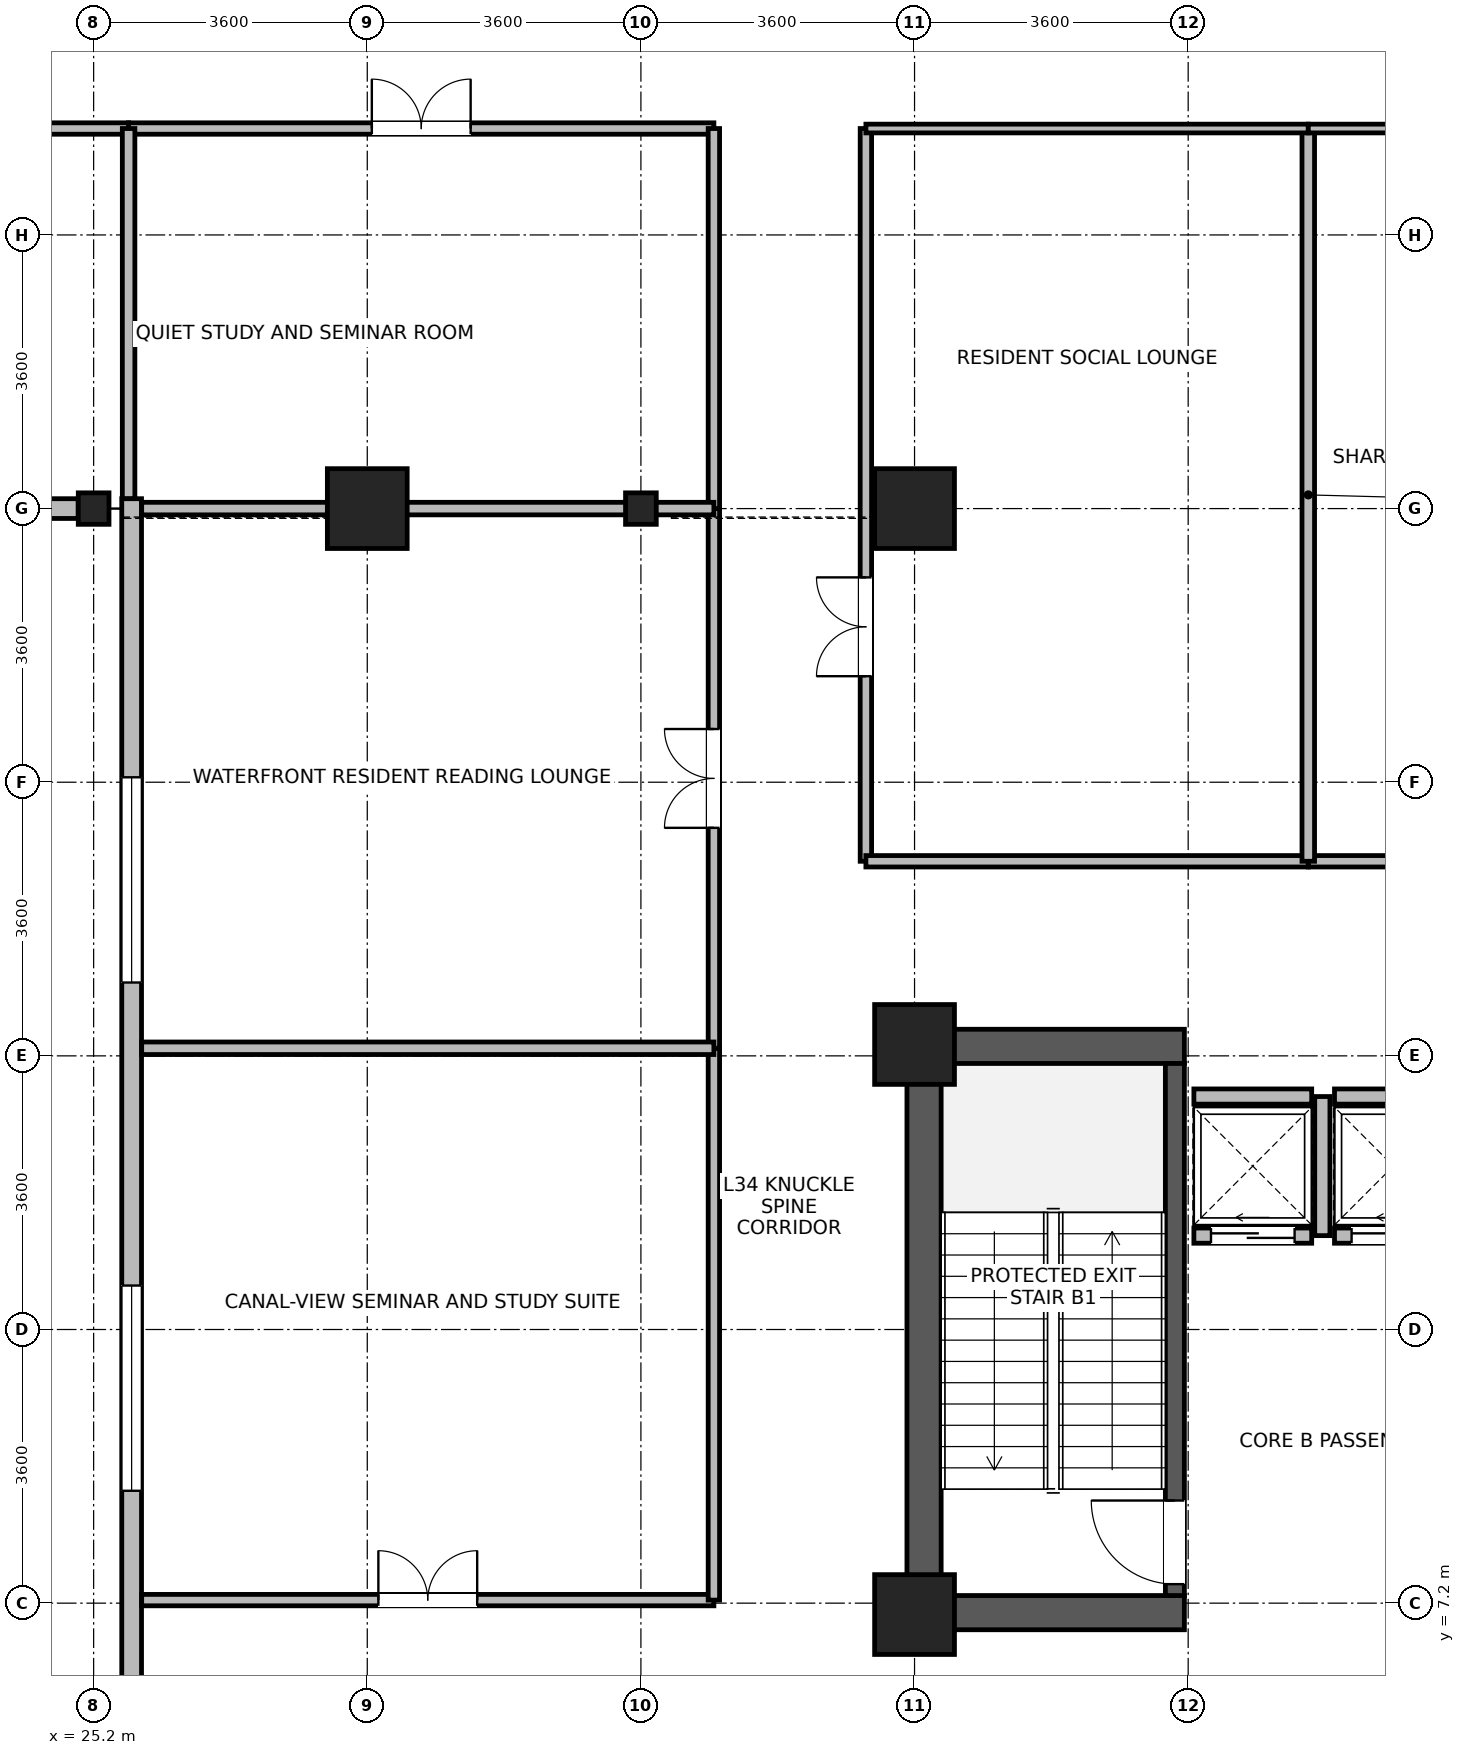
"""IFC4 building model, lengths in metres.
Left out: names, types, materials, properties, quantities, classifications, styles, units other than length and angle.
Written with IfcOpenShell. Run it as: python <this file> out.ifc"""

import sys

from ifc_helpers import new_model, si_unit, direction, frame, frame_2d, origin, origin_2d, place, context, subcontext, project, spatial, rectangle, i_section, extrude, source, transform, mapped, element, fill, save


model = new_model("IFC4")
c1 = context("Model", 3, precision=1e-05, world=origin(), true_north=direction((0.0, 1.0)))
c2 = subcontext(c1, "Body", "Model", "MODEL_VIEW")
j1 = project(units=[si_unit("LENGTHUNIT", "METRE"), si_unit("PLANEANGLEUNIT", "RADIAN")], contexts=[c1])
p1 = place(None, origin())
s1 = spatial("IfcSite", under=j1, at=p1, CompositionType="ELEMENT")
p2 = place(p1, origin())
s2 = spatial("IfcBuilding", under=s1, at=p2, CompositionType="ELEMENT")
p3 = place(p2, frame((0.0, 0.0, 135.6)))
s3 = spatial("IfcBuildingStorey", under=s2, at=p3, CompositionType="ELEMENT", Elevation=135.6)
p4 = place(p3, frame((36.125, 6.85, 0.0), z_axis=(0.0, 0.0, 1.0), x_axis=(0.0, 1.0, 0.0)))
e1 = element("IfcWall", 1, at=p4, inside=s3, PredefinedType="SHEAR", context=c2, shape_type="SweptSolid", body=[
    extrude(rectangle(XDim=7.9, YDim=0.45, at=frame_2d((3.95, 0.0))), origin(), (0.0, 0.0, 1.0), 4.36),
])
for number, where, z_axis, x_axis in (
    (2, (36.35, 7.075, 0.0), (0.0, 0.0, 1.0), (1.0, 0.0, 0.0)),
    (3, (36.35, 14.525, 0.0), (0.0, 0.0, 1.0), (1.0, 0.0, 0.0)),
):
    element("IfcWall", number, at=place(p3, frame(where, z_axis=z_axis, x_axis=x_axis)), inside=s3, PredefinedType="SHEAR", context=c2, shape_type="SweptSolid", body=[
        extrude(rectangle(XDim=3.2, YDim=0.45, at=frame_2d((1.6, 0.0))), origin(), (0.0, 0.0, 1.0), 4.36),
    ])
p5 = place(p3, frame((39.425, 7.3, 0.0), z_axis=(0.0, 0.0, 1.0), x_axis=(0.0, 1.0, 0.0)))
e4 = element("IfcWall", 4, at=p5, inside=s3, PredefinedType="SHEAR", context=c2, shape_type="SweptSolid", body=[
    extrude(rectangle(XDim=7.0, YDim=0.25, at=frame_2d((3.5, 0.0))), origin(), (0.0, 0.0, 1.0), 4.36),
])
p6 = place(p5, frame((0.15, 0.0, 0.0)))
e5 = element("IfcOpeningElement", 5, at=p6, cuts=e4, PredefinedType="OPENING", context=c2, shape_type="SweptSolid", body=[
    extrude(rectangle(XDim=1.1, YDim=2.08, at=frame_2d((0.55, 1.04))), frame((0.0, 0.135, 0.0), z_axis=(0.0, -1.0, 0.0), x_axis=(1.0, 0.0, 0.0)), (0.0, 0.0, 1.0), 0.27),
])
m1 = source(origin(), c2, "Body", "SweptSolid", [
    extrude(rectangle(XDim=1.05, YDim=1.05, at=origin_2d()), origin(), (0.0, 0.0, 1.0), 4.6),
])
for number, where, z_axis, x_axis in (
    (6, (28.8, 21.6, 0.0), (0.0, 0.0, 1.0), (1.0, 0.0, 0.0)),
    (7, (36.0, 21.6, 0.0), (0.0, 0.0, 1.0), (1.0, 0.0, 0.0)),
    (8, (36.0, 7.05, 0.0), (0.0, 0.0, 1.0), (1.0, 0.0, 0.0)),
    (9, (36.0, 14.55, 0.0), (0.0, 0.0, 1.0), (1.0, 0.0, 0.0)),
):
    element("IfcColumn", number, at=place(p3, frame(where, z_axis=z_axis, x_axis=x_axis)), inside=s3, PredefinedType="COLUMN", context=c2, shape_type="MappedRepresentation", body=[
        mapped(m1, transform((0.0, 0.0, 0.0), x_axis=(1.0, 0.0, 0.0), y_axis=(0.0, 1.0, 0.0), z_axis=(0.0, 0.0, 1.0), scale=1.0)),
    ])
m2 = source(origin(), c2, "Body", "SweptSolid", [
    extrude(i_section(OverallWidth=0.404, OverallDepth=0.414, WebThickness=0.021, FlangeThickness=0.028, FilletRadius=0.015, at=origin_2d()), origin(), (0.0, 0.0, 1.0), 4.6),
])
for number, where, z_axis, x_axis in (
    (10, (25.2, 21.6, 0.0), (0.0, 0.0, 1.0), (1.0, 0.0, 0.0)),
    (11, (32.4, 21.6, 0.0), (0.0, 0.0, 1.0), (1.0, 0.0, 0.0)),
):
    element("IfcColumn", number, at=place(p3, frame(where, z_axis=z_axis, x_axis=x_axis)), inside=s3, PredefinedType="COLUMN", context=c2, shape_type="MappedRepresentation", body=[
        mapped(m2, transform((0.0, 0.0, 0.0), x_axis=(1.0, 0.0, 0.0), y_axis=(0.0, 1.0, 0.0), z_axis=(0.0, 0.0, 1.0), scale=1.0)),
    ])
p7 = place(p3, frame((24.997, 21.6, 0.0), z_axis=(0.0, 0.0, 1.0), x_axis=(-1.0, 0.0, 0.0)))
e12 = element("IfcWall", 12, at=p7, inside=s3, PredefinedType="STANDARD", context=c2, shape_type="SweptSolid", body=[
    extrude(rectangle(XDim=2.871, YDim=0.26, at=frame_2d((1.436, 0.0))), origin(), (0.0, 0.0, 1.0), 3.89),
])
p8 = place(p7, frame((0.96, 0.0, 0.85)))
e13 = element("IfcOpeningElement", 13, at=p8, cuts=e12, PredefinedType="OPENING", context=c2, shape_type="SweptSolid", body=[
    extrude(rectangle(XDim=0.95, YDim=1.75, at=frame_2d((0.475, 0.875))), frame((0.0, 0.14, 0.0), z_axis=(0.0, -1.0, 0.0), x_axis=(1.0, 0.0, 0.0)), (0.0, 0.0, 1.0), 0.28),
])
p9 = place(p3, frame((25.7, 1.67, 0.0), z_axis=(0.0, 0.0, 1.0), x_axis=(0.0, 1.0, 0.0)))
e14 = element("IfcWall", 14, at=p9, inside=s3, PredefinedType="STANDARD", context=c2, shape_type="SweptSolid", body=[
    extrude(rectangle(XDim=20.06, YDim=0.26, at=frame_2d((10.03, 0.0))), origin(), (0.0, 0.0, 1.0), 4.34),
])
p10 = place(p9, frame((7.008, 0.0, 0.85)))
e15 = element("IfcOpeningElement", 15, at=p10, cuts=e14, PredefinedType="OPENING", context=c2, shape_type="SweptSolid", body=[
    extrude(rectangle(XDim=2.7, YDim=2.05, at=frame_2d((1.35, 1.025))), frame((0.0, 0.14, 0.0), z_axis=(0.0, -1.0, 0.0), x_axis=(1.0, 0.0, 0.0)), (0.0, 0.0, 1.0), 0.28),
])
p11 = place(p9, frame((13.695, 0.0, 0.85)))
e16 = element("IfcOpeningElement", 16, at=p11, cuts=e14, PredefinedType="OPENING", context=c2, shape_type="SweptSolid", body=[
    extrude(rectangle(XDim=2.7, YDim=2.05, at=frame_2d((1.35, 1.025))), frame((0.0, 0.14, 0.0), z_axis=(0.0, -1.0, 0.0), x_axis=(1.0, 0.0, 0.0)), (0.0, 0.0, 1.0), 0.28),
])
p12 = place(p3, frame((39.675, 12.035, 0.0), z_axis=(0.0, 0.0, 1.0), x_axis=(1.0, 0.0, 0.0)))
e17 = element("IfcWall", 17, at=p12, inside=s3, PredefinedType="PARTITIONING", context=c2, shape_type="SweptSolid", body=[
    extrude(rectangle(XDim=1.55, YDim=0.2, at=frame_2d((0.775, 0.0))), origin(), (0.0, 0.0, 1.0), 4.34),
])
p13 = place(p12, frame((0.225, 0.0, 0.0)))
e18 = element("IfcOpeningElement", 18, at=p13, cuts=e17, PredefinedType="OPENING", context=c2, shape_type="SweptSolid", body=[
    extrude(rectangle(XDim=1.1, YDim=2.12, at=frame_2d((0.55, 1.06))), frame((0.0, 0.11, 0.0), z_axis=(0.0, -1.0, 0.0), x_axis=(1.0, 0.0, 0.0)), (0.0, 0.0, 1.0), 0.22),
])
p14 = place(p3, frame((39.675, 13.865, 0.0), z_axis=(0.0, 0.0, 1.0), x_axis=(1.0, 0.0, 0.0)))
e19 = element("IfcWall", 19, at=p14, inside=s3, PredefinedType="PARTITIONING", context=c2, shape_type="SweptSolid", body=[
    extrude(rectangle(XDim=1.55, YDim=0.2, at=frame_2d((0.775, 0.0))), origin(), (0.0, 0.0, 1.0), 4.34),
])
p15 = place(p3, frame((41.365, 12.035, 0.0), z_axis=(0.0, 0.0, 1.0), x_axis=(0.0, 1.0, 0.0)))
e20 = element("IfcWall", 20, at=p15, inside=s3, PredefinedType="PARTITIONING", context=c2, shape_type="SweptSolid", body=[
    extrude(rectangle(XDim=1.83, YDim=0.2, at=frame_2d((0.915, 0.0))), origin(), (0.0, 0.0, 1.0), 4.34),
])
p16 = place(p3, frame((41.525, 12.035, 0.0), z_axis=(0.0, 0.0, 1.0), x_axis=(1.0, 0.0, 0.0)))
e21 = element("IfcWall", 21, at=p16, inside=s3, PredefinedType="PARTITIONING", context=c2, shape_type="SweptSolid", body=[
    extrude(rectangle(XDim=1.55, YDim=0.2, at=frame_2d((0.775, 0.0))), origin(), (0.0, 0.0, 1.0), 4.34),
])
p17 = place(p16, frame((0.225, 0.0, 0.0)))
e22 = element("IfcOpeningElement", 22, at=p17, cuts=e21, PredefinedType="OPENING", context=c2, shape_type="SweptSolid", body=[
    extrude(rectangle(XDim=1.1, YDim=2.12, at=frame_2d((0.55, 1.06))), frame((0.0, 0.11, 0.0), z_axis=(0.0, -1.0, 0.0), x_axis=(1.0, 0.0, 0.0)), (0.0, 0.0, 1.0), 0.22),
])
p18 = place(p3, frame((41.525, 13.865, 0.0), z_axis=(0.0, 0.0, 1.0), x_axis=(1.0, 0.0, 0.0)))
e23 = element("IfcWall", 23, at=p18, inside=s3, PredefinedType="PARTITIONING", context=c2, shape_type="SweptSolid", body=[
    extrude(rectangle(XDim=1.55, YDim=0.2, at=frame_2d((0.775, 0.0))), origin(), (0.0, 0.0, 1.0), 4.34),
])
p19 = place(p3, frame((35.36, 16.96, 0.0), z_axis=(0.0, 0.0, 1.0), x_axis=(0.0, 1.0, 0.0)))
e24 = element("IfcWall", 24, at=p19, inside=s3, PredefinedType="PARTITIONING", context=c2, shape_type="SweptSolid", body=[
    extrude(rectangle(XDim=9.64, YDim=0.15, at=frame_2d((4.82, 0.0))), origin(), (0.0, 0.0, 1.0), 4.34),
])
p20 = place(p19, frame((2.435, 0.0, 0.0)))
e25 = element("IfcOpeningElement", 25, at=p20, cuts=e24, PredefinedType="OPENING", context=c2, shape_type="SweptSolid", body=[
    extrude(rectangle(XDim=1.3, YDim=2.12, at=frame_2d((0.65, 1.06))), frame((0.0, 0.085, 0.0), z_axis=(0.0, -1.0, 0.0), x_axis=(1.0, 0.0, 0.0)), (0.0, 0.0, 1.0), 0.17),
])
p21 = place(p3, frame((17.4, 26.6, 0.0), z_axis=(0.0, 0.0, 1.0), x_axis=(1.0, 0.0, 0.0)))
e26 = element("IfcWall", 26, at=p21, inside=s3, PredefinedType="PARTITIONING", context=c2, shape_type="SweptSolid", body=[
    extrude(rectangle(XDim=8.26, YDim=0.15, at=frame_2d((4.13, 0.0))), origin(), (0.0, 0.0, 1.0), 4.34),
])
p22 = place(p21, frame((3.655, 0.0, 0.0)))
e27 = element("IfcOpeningElement", 27, at=p22, cuts=e26, PredefinedType="OPENING", context=c2, shape_type="SweptSolid", body=[
    extrude(rectangle(XDim=0.95, YDim=2.1, at=frame_2d((0.475, 1.05))), frame((0.0, 0.085, 0.0), z_axis=(0.0, -1.0, 0.0), x_axis=(1.0, 0.0, 0.0)), (0.0, 0.0, 1.0), 0.17),
])
p23 = place(p3, frame((25.66, 26.6, 0.0), z_axis=(0.0, 0.0, 1.0), x_axis=(1.0, 0.0, 0.0)))
e28 = element("IfcWall", 28, at=p23, inside=s3, PredefinedType="PARTITIONING", context=c2, shape_type="SweptSolid", body=[
    extrude(rectangle(XDim=7.7, YDim=0.15, at=frame_2d((3.85, 0.0))), origin(), (0.0, 0.0, 1.0), 4.34),
])
p24 = place(p23, frame((3.2, 0.0, 0.0)))
e29 = element("IfcOpeningElement", 29, at=p24, cuts=e28, PredefinedType="OPENING", context=c2, shape_type="SweptSolid", body=[
    extrude(rectangle(XDim=1.3, YDim=2.12, at=frame_2d((0.65, 1.06))), frame((0.0, 0.085, 0.0), z_axis=(0.0, -1.0, 0.0), x_axis=(1.0, 0.0, 0.0)), (0.0, 0.0, 1.0), 0.17),
])
p25 = place(p3, frame((25.832, 7.24, 0.0), z_axis=(0.0, 0.0, 1.0), x_axis=(1.0, 0.0, 0.0)))
e30 = element("IfcWall", 30, at=p25, inside=s3, PredefinedType="PARTITIONING", context=c2, shape_type="SweptSolid", body=[
    extrude(rectangle(XDim=7.528, YDim=0.15, at=frame_2d((3.764, 0.0))), origin(), (0.0, 0.0, 1.0), 4.34),
])
p26 = place(p25, frame((3.114, 0.0, 0.0)))
e31 = element("IfcOpeningElement", 31, at=p26, cuts=e30, PredefinedType="OPENING", context=c2, shape_type="SweptSolid", body=[
    extrude(rectangle(XDim=1.3, YDim=2.12, at=frame_2d((0.65, 1.06))), frame((0.0, 0.085, 0.0), z_axis=(0.0, -1.0, 0.0), x_axis=(1.0, 0.0, 0.0)), (0.0, 0.0, 1.0), 0.17),
])
p27 = place(p3, frame((33.36, 7.24, 0.0), z_axis=(0.0, 0.0, 1.0), x_axis=(0.0, 1.0, 0.0)))
e32 = element("IfcWall", 32, at=p27, inside=s3, PredefinedType="PARTITIONING", context=c2, shape_type="SweptSolid", body=[
    extrude(rectangle(XDim=7.26, YDim=0.15, at=frame_2d((3.63, 0.0))), origin(), (0.0, 0.0, 1.0), 4.34),
])
p28 = place(p3, frame((33.36, 14.5, 0.0), z_axis=(0.0, 0.0, 1.0), x_axis=(0.0, 1.0, 0.0)))
e33 = element("IfcWall", 33, at=p28, inside=s3, PredefinedType="PARTITIONING", context=c2, shape_type="SweptSolid", body=[
    extrude(rectangle(XDim=7.1, YDim=0.15, at=frame_2d((3.55, 0.0))), origin(), (0.0, 0.0, 1.0), 4.34),
])
p29 = place(p28, frame((2.9, 0.0, 0.0)))
e34 = element("IfcOpeningElement", 34, at=p29, cuts=e33, PredefinedType="OPENING", context=c2, shape_type="SweptSolid", body=[
    extrude(rectangle(XDim=1.3, YDim=2.12, at=frame_2d((0.65, 1.06))), frame((0.0, 0.085, 0.0), z_axis=(0.0, -1.0, 0.0), x_axis=(1.0, 0.0, 0.0)), (0.0, 0.0, 1.0), 0.17),
])
p30 = place(p3, frame((35.36, 16.96, 0.0), z_axis=(0.0, 0.0, 1.0), x_axis=(1.0, 0.0, 0.0)))
e35 = element("IfcWall", 35, at=p30, inside=s3, PredefinedType="PARTITIONING", context=c2, shape_type="SweptSolid", body=[
    extrude(rectangle(XDim=5.82, YDim=0.15, at=frame_2d((2.91, 0.0))), origin(), (0.0, 0.0, 1.0), 4.34),
])
p31 = place(p3, frame((33.36, 21.6, 0.0), z_axis=(0.0, 0.0, 1.0), x_axis=(0.0, 1.0, 0.0)))
e36 = element("IfcWall", 36, at=p31, inside=s3, PredefinedType="PARTITIONING", context=c2, shape_type="SweptSolid", body=[
    extrude(rectangle(XDim=5.0, YDim=0.15, at=frame_2d((2.5, 0.0))), origin(), (0.0, 0.0, 1.0), 4.34),
])
p32 = place(p3, frame((41.18, 16.96, 0.0), z_axis=(0.0, 0.0, 1.0), x_axis=(1.0, 0.0, 0.0)))
e37 = element("IfcWall", 37, at=p32, inside=s3, PredefinedType="PARTITIONING", context=c2, shape_type="SweptSolid", body=[
    extrude(rectangle(XDim=4.74, YDim=0.15, at=frame_2d((2.37, 0.0))), origin(), (0.0, 0.0, 1.0), 4.34),
])
p33 = place(p32, frame((1.92, 0.0, 0.0)))
e38 = element("IfcOpeningElement", 38, at=p33, cuts=e37, PredefinedType="OPENING", context=c2, shape_type="SweptSolid", body=[
    extrude(rectangle(XDim=0.9, YDim=2.08, at=frame_2d((0.45, 1.04))), frame((0.0, 0.085, 0.0), z_axis=(0.0, -1.0, 0.0), x_axis=(1.0, 0.0, 0.0)), (0.0, 0.0, 1.0), 0.17),
])
p34 = place(p3, frame((41.18, 16.96, 0.0), z_axis=(0.0, 0.0, 1.0), x_axis=(0.0, 1.0, 0.0)))
e39 = element("IfcWall", 39, at=p34, inside=s3, PredefinedType="PARTITIONING", context=c2, shape_type="SweptSolid", body=[
    extrude(rectangle(XDim=9.64, YDim=0.165, at=frame_2d((4.82, 0.0))), origin(), (0.0, 0.0, 1.0), 4.34),
])
p35 = place(p3, frame((25.832, 14.5, 0.0), z_axis=(0.0, 0.0, 1.0), x_axis=(1.0, 0.0, 0.0)))
e40 = element("IfcWall", 40, at=p35, inside=s3, PredefinedType="PARTITIONING", context=c2, shape_type="SweptSolid", body=[
    extrude(rectangle(XDim=7.528, YDim=0.165, at=frame_2d((3.764, 0.0))), origin(), (0.0, 0.0, 1.0), 4.34),
])
p36 = place(p3, frame((25.832, 21.6, 0.0), z_axis=(0.0, 0.0, 1.0), x_axis=(1.0, 0.0, 0.0)))
e41 = element("IfcWall", 41, at=p36, inside=s3, PredefinedType="PARTITIONING", context=c2, shape_type="SweptSolid", body=[
    extrude(rectangle(XDim=7.528, YDim=0.165, at=frame_2d((3.764, 0.0))), origin(), (0.0, 0.0, 1.0), 3.89),
])
p37 = place(p3, frame((35.36, 26.6, 0.0), z_axis=(0.0, 0.0, 1.0), x_axis=(1.0, 0.0, 0.0)))
e42 = element("IfcWall", 42, at=p37, inside=s3, PredefinedType="PARTITIONING", context=c2, shape_type="SweptSolid", body=[
    extrude(rectangle(XDim=5.82, YDim=0.115, at=frame_2d((2.91, 0.0))), origin(), (0.0, 0.0, 1.0), 4.34),
])
p38 = place(p3, frame((25.66, 21.732, 0.0), z_axis=(0.0, 0.0, 1.0), x_axis=(0.0, 1.0, 0.0)))
e43 = element("IfcWall", 43, at=p38, inside=s3, PredefinedType="PARTITIONING", context=c2, shape_type="SweptSolid", body=[
    extrude(rectangle(XDim=4.868, YDim=0.165, at=frame_2d((2.434, 0.0))), origin(), (0.0, 0.0, 1.0), 4.34),
])
p39 = place(p3, frame((41.18, 26.6, 0.0), z_axis=(0.0, 0.0, 1.0), x_axis=(1.0, 0.0, 0.0)))
e44 = element("IfcWall", 44, at=p39, inside=s3, PredefinedType="PARTITIONING", context=c2, shape_type="SweptSolid", body=[
    extrude(rectangle(XDim=4.74, YDim=0.115, at=frame_2d((2.37, 0.0))), origin(), (0.0, 0.0, 1.0), 4.34),
])
p40 = place(p10, origin())
e45 = element("IfcWindow", 45, at=p40, inside=s3, PartitioningType="SINGLE_PANEL", PredefinedType="WINDOW", context=c2, shape_type="SweptSolid", body=[
    extrude(rectangle(XDim=2.7, YDim=2.05, at=frame_2d((1.35, 1.025))), frame((0.0, 0.03, 0.0), z_axis=(0.0, -1.0, 0.0), x_axis=(1.0, 0.0, 0.0)), (0.0, 0.0, 1.0), 0.06),
])
fill(e15, e45)
p41 = place(p11, origin())
e46 = element("IfcWindow", 46, at=p41, inside=s3, PartitioningType="SINGLE_PANEL", PredefinedType="WINDOW", context=c2, shape_type="SweptSolid", body=[
    extrude(rectangle(XDim=2.7, YDim=2.05, at=frame_2d((1.35, 1.025))), frame((0.0, 0.03, 0.0), z_axis=(0.0, -1.0, 0.0), x_axis=(1.0, 0.0, 0.0)), (0.0, 0.0, 1.0), 0.06),
])
fill(e16, e46)
p42 = place(p6, origin())
e47 = element("IfcDoor", 47, at=p42, inside=s3, OperationType="SINGLE_SWING_RIGHT", PredefinedType="DOOR", context=c2, shape_type="SweptSolid", body=[
    extrude(rectangle(XDim=1.1, YDim=2.08, at=frame_2d((0.55, 1.04))), frame((0.0, 0.025, 0.0), z_axis=(0.0, -1.0, 0.0), x_axis=(1.0, 0.0, 0.0)), (0.0, 0.0, 1.0), 0.05),
])
fill(e5, e47)
p43 = place(p13, origin())
e48 = element("IfcDoor", 48, at=p43, inside=s3, OperationType="SLIDING_TO_LEFT", PredefinedType="DOOR", context=c2, shape_type="SweptSolid", body=[
    extrude(rectangle(XDim=1.1, YDim=2.12, at=frame_2d((0.55, 1.06))), frame((0.0, 0.025, 0.0), z_axis=(0.0, -1.0, 0.0), x_axis=(1.0, 0.0, 0.0)), (0.0, 0.0, 1.0), 0.05),
])
fill(e18, e48)
p44 = place(p17, origin())
e49 = element("IfcDoor", 49, at=p44, inside=s3, OperationType="SLIDING_TO_LEFT", PredefinedType="DOOR", context=c2, shape_type="SweptSolid", body=[
    extrude(rectangle(XDim=1.1, YDim=2.12, at=frame_2d((0.55, 1.06))), frame((0.0, 0.025, 0.0), z_axis=(0.0, -1.0, 0.0), x_axis=(1.0, 0.0, 0.0)), (0.0, 0.0, 1.0), 0.05),
])
fill(e22, e49)
p45 = place(p20, origin())
e50 = element("IfcDoor", 50, at=p45, inside=s3, OperationType="DOUBLE_DOOR_SINGLE_SWING", PredefinedType="DOOR", context=c2, shape_type="SweptSolid", body=[
    extrude(rectangle(XDim=1.3, YDim=2.12, at=frame_2d((0.65, 1.06))), frame((0.0, 0.025, 0.0), z_axis=(0.0, -1.0, 0.0), x_axis=(1.0, 0.0, 0.0)), (0.0, 0.0, 1.0), 0.05),
])
fill(e25, e50)
p46 = place(p24, origin())
e51 = element("IfcDoor", 51, at=p46, inside=s3, OperationType="DOUBLE_DOOR_SINGLE_SWING", PredefinedType="DOOR", context=c2, shape_type="SweptSolid", body=[
    extrude(rectangle(XDim=1.3, YDim=2.12, at=frame_2d((0.65, 1.06))), frame((0.0, 0.025, 0.0), z_axis=(0.0, -1.0, 0.0), x_axis=(1.0, 0.0, 0.0)), (0.0, 0.0, 1.0), 0.05),
])
fill(e29, e51)
p47 = place(p26, origin())
e52 = element("IfcDoor", 52, at=p47, inside=s3, OperationType="DOUBLE_DOOR_SINGLE_SWING", PredefinedType="DOOR", context=c2, shape_type="SweptSolid", body=[
    extrude(rectangle(XDim=1.3, YDim=2.12, at=frame_2d((0.65, 1.06))), frame((0.0, 0.025, 0.0), z_axis=(0.0, -1.0, 0.0), x_axis=(1.0, 0.0, 0.0)), (0.0, 0.0, 1.0), 0.05),
])
fill(e31, e52)
p48 = place(p29, origin())
e53 = element("IfcDoor", 53, at=p48, inside=s3, OperationType="DOUBLE_DOOR_SINGLE_SWING", PredefinedType="DOOR", context=c2, shape_type="SweptSolid", body=[
    extrude(rectangle(XDim=1.3, YDim=2.12, at=frame_2d((0.65, 1.06))), frame((0.0, 0.025, 0.0), z_axis=(0.0, -1.0, 0.0), x_axis=(1.0, 0.0, 0.0)), (0.0, 0.0, 1.0), 0.05),
])
fill(e34, e53)
save(model, sys.argv[1])
